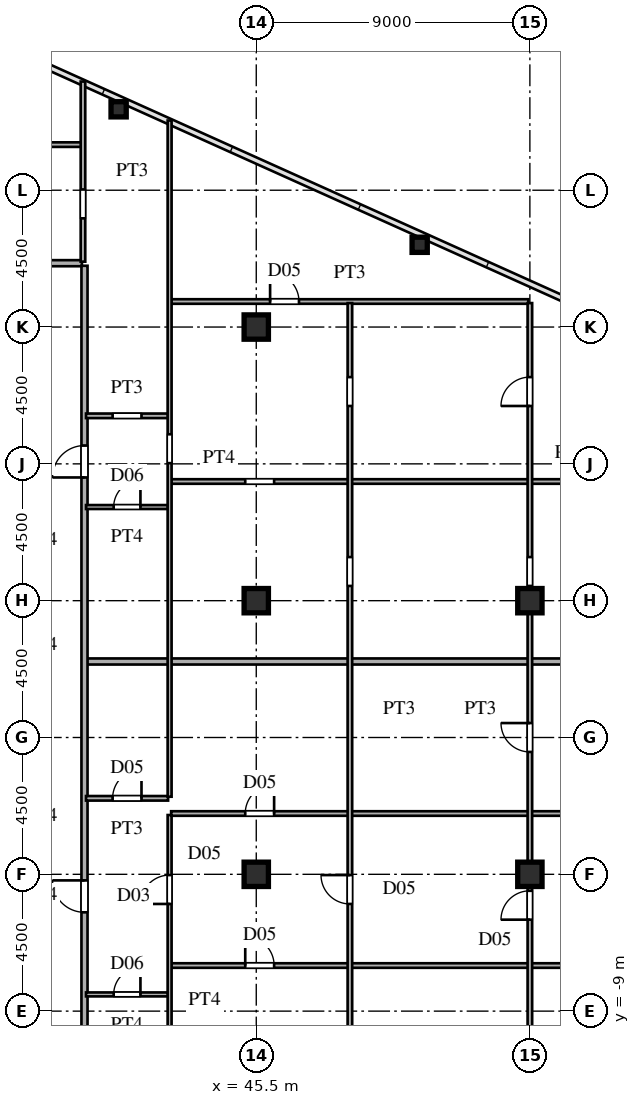
"""IFC4 building model, lengths in metres.
Left out: names, types, materials, properties, quantities, classifications, styles, units other than length and angle.
Written with IfcOpenShell. Run it as: python <this file> out.ifc"""

import sys

from ifc_helpers import new_model, si_unit, direction, frame, frame_2d, origin, origin_2d, place, context, subcontext, project, spatial, rectangle, hollow_rectangle, i_section, extrude, source, transform, mapped, element, fill, save


model = new_model("IFC4")
c1 = context("Model", 3, precision=1e-05, world=origin(), true_north=direction((0.0, 1.0)))
c2 = subcontext(c1, "Body", "Model", "MODEL_VIEW")
j1 = project(units=[si_unit("LENGTHUNIT", "METRE"), si_unit("PLANEANGLEUNIT", "RADIAN")], contexts=[c1])
p1 = place(None, origin())
s1 = spatial("IfcSite", under=j1, at=p1, CompositionType="ELEMENT")
p2 = place(p1, origin())
s2 = spatial("IfcBuilding", under=s1, at=p2, CompositionType="ELEMENT")
p3 = place(p2, frame((0.0, 0.0, 96.0)))
s3 = spatial("IfcBuildingStorey", under=s2, at=p3, CompositionType="ELEMENT", Elevation=96.0)
m1 = source(origin(), c2, "Body", "SweptSolid", [
    extrude(i_section(OverallWidth=0.8, OverallDepth=0.8, WebThickness=0.032, FlangeThickness=0.05, at=origin_2d()), origin(), (0.0, 0.0, 1.0), 3.6),
])
for number, where, z_axis, x_axis in (
    (1, (45.5, -4.5, 0.0), (0.0, 0.0, 1.0), (1.0, 0.0, 0.0)),
    (2, (45.5, 4.5, 0.0), (0.0, 0.0, 1.0), (1.0, 0.0, 0.0)),
    (3, (45.5, 13.5, 0.0), (0.0, 0.0, 1.0), (1.0, 0.0, 0.0)),
    (4, (54.5, -4.5, 0.0), (0.0, 0.0, 1.0), (1.0, 0.0, 0.0)),
    (5, (54.5, 4.5, 0.0), (0.0, 0.0, 1.0), (1.0, 0.0, 0.0)),
):
    element("IfcColumn", number, at=place(p3, frame(where, z_axis=z_axis, x_axis=x_axis)), inside=s3, PredefinedType="COLUMN", context=c2, shape_type="MappedRepresentation", body=[
        mapped(m1, transform((0.0, 0.0, 0.0), scale=1.0)),
    ])
m2 = source(origin(), c2, "Body", "SweptSolid", [
    extrude(hollow_rectangle(XDim=0.5, YDim=0.5, WallThickness=0.02, at=origin_2d()), origin(), (0.0, 0.0, 1.0), 3.6),
])
for number, where, z_axis, x_axis in (
    (6, (40.973, 20.661, 0.0), (0.0, 0.0, 1.0), (1.0, 0.0, 0.0)),
    (7, (50.875, 16.205, 0.0), (0.0, 0.0, 1.0), (1.0, 0.0, 0.0)),
):
    element("IfcColumn", number, at=place(p3, frame(where, z_axis=z_axis, x_axis=x_axis)), inside=s3, PredefinedType="COLUMN", context=c2, shape_type="MappedRepresentation", body=[
        mapped(m2, transform((0.0, 0.0, 0.0), scale=1.0)),
    ])
p4 = place(p3, frame((39.9, -8.45, 0.0), z_axis=(0.0, 0.0, 1.0), x_axis=(1.0, 0.0, 0.0)))
e8 = element("IfcWall", 8, at=p4, inside=s3, PredefinedType="PARTITIONING", context=c2, shape_type="SweptSolid", body=[
    extrude(rectangle(XDim=2.7, YDim=0.13, at=frame_2d((1.35, 0.0))), origin(), (0.0, 0.0, 1.0), 3.38),
])
p5 = place(p4, frame((0.91, 0.0, 0.0)))
e9 = element("IfcOpeningElement", 9, at=p5, cuts=e8, PredefinedType="OPENING", context=c2, shape_type="SweptSolid", body=[
    extrude(rectangle(XDim=0.88, YDim=2.1, at=frame_2d((0.44, 1.05))), frame((0.0, 0.075, 0.0), z_axis=(0.0, -1.0, 0.0), x_axis=(1.0, 0.0, 0.0)), (0.0, 0.0, 1.0), 0.15),
])
p6 = place(p3, frame((42.7, -7.5, 0.0), z_axis=(0.0, 0.0, 1.0), x_axis=(1.0, 0.0, 0.0)))
e10 = element("IfcWall", 10, at=p6, inside=s3, PredefinedType="PARTITIONING", context=c2, shape_type="SweptSolid", body=[
    extrude(rectangle(XDim=27.995, YDim=0.15, at=frame_2d((13.998, 0.0))), origin(), (0.0, 0.0, 1.0), 3.38),
])
p7 = place(p6, frame((2.438, 0.0, 0.0)))
e11 = element("IfcOpeningElement", 11, at=p7, cuts=e10, PredefinedType="OPENING", context=c2, shape_type="SweptSolid", body=[
    extrude(rectangle(XDim=0.95, YDim=2.15, at=frame_2d((0.475, 1.075))), frame((0.0, 0.085, 0.0), z_axis=(0.0, -1.0, 0.0), x_axis=(1.0, 0.0, 0.0)), (0.0, 0.0, 1.0), 0.17),
])
p8 = place(p6, frame((14.175, 0.0, 0.0)))
e12 = element("IfcOpeningElement", 12, at=p8, cuts=e10, PredefinedType="OPENING", context=c2, shape_type="SweptSolid", body=[
    extrude(rectangle(XDim=0.95, YDim=2.15, at=frame_2d((0.475, 1.075))), frame((0.0, 0.085, 0.0), z_axis=(0.0, -1.0, 0.0), x_axis=(1.0, 0.0, 0.0)), (0.0, 0.0, 1.0), 0.17),
])
p9 = place(p3, frame((42.7, -2.5, 0.0), z_axis=(0.0, 0.0, 1.0), x_axis=(1.0, 0.0, 0.0)))
e13 = element("IfcWall", 13, at=p9, inside=s3, PredefinedType="PARTITIONING", context=c2, shape_type="SweptSolid", body=[
    extrude(rectangle(XDim=28.335, YDim=0.15, at=frame_2d((14.167, 0.0))), origin(), (0.0, 0.0, 1.0), 3.38),
])
p10 = place(p9, frame((2.438, 0.0, 0.0)))
e14 = element("IfcOpeningElement", 14, at=p10, cuts=e13, PredefinedType="OPENING", context=c2, shape_type="SweptSolid", body=[
    extrude(rectangle(XDim=0.95, YDim=2.15, at=frame_2d((0.475, 1.075))), frame((0.0, 0.085, 0.0), z_axis=(0.0, -1.0, 0.0), x_axis=(1.0, 0.0, 0.0)), (0.0, 0.0, 1.0), 0.17),
])
p11 = place(p9, frame((14.175, 0.0, 0.0)))
e15 = element("IfcOpeningElement", 15, at=p11, cuts=e13, PredefinedType="OPENING", context=c2, shape_type="SweptSolid", body=[
    extrude(rectangle(XDim=0.95, YDim=2.15, at=frame_2d((0.475, 1.075))), frame((0.0, 0.085, 0.0), z_axis=(0.0, -1.0, 0.0), x_axis=(1.0, 0.0, 0.0)), (0.0, 0.0, 1.0), 0.17),
])
p12 = place(p3, frame((39.9, -2.0, 0.0), z_axis=(0.0, 0.0, 1.0), x_axis=(1.0, 0.0, 0.0)))
e16 = element("IfcWall", 16, at=p12, inside=s3, PredefinedType="PARTITIONING", context=c2, shape_type="SweptSolid", body=[
    extrude(rectangle(XDim=2.7, YDim=0.15, at=frame_2d((1.35, 0.0))), origin(), (0.0, 0.0, 1.0), 3.38),
])
p13 = place(p12, frame((0.875, 0.0, 0.0)))
e17 = element("IfcOpeningElement", 17, at=p13, cuts=e16, PredefinedType="OPENING", context=c2, shape_type="SweptSolid", body=[
    extrude(rectangle(XDim=0.95, YDim=2.15, at=frame_2d((0.475, 1.075))), frame((0.0, 0.085, 0.0), z_axis=(0.0, -1.0, 0.0), x_axis=(1.0, 0.0, 0.0)), (0.0, 0.0, 1.0), 0.17),
])
p14 = place(p3, frame((39.93, 2.5, 0.0), z_axis=(0.0, 0.0, 1.0), x_axis=(1.0, 0.0, 0.0)))
e18 = element("IfcWall", 18, at=p14, inside=s3, PredefinedType="PARTITIONING", context=c2, shape_type="SweptSolid", body=[
    extrude(rectangle(XDim=31.075, YDim=0.2, at=frame_2d((15.538, 0.0))), origin(), (0.0, 0.0, 1.0), 3.38),
])
p15 = place(p3, frame((39.9, 7.58, 0.0), z_axis=(0.0, 0.0, 1.0), x_axis=(1.0, 0.0, 0.0)))
e19 = element("IfcWall", 19, at=p15, inside=s3, PredefinedType="PARTITIONING", context=c2, shape_type="SweptSolid", body=[
    extrude(rectangle(XDim=2.7, YDim=0.13, at=frame_2d((1.35, 0.0))), origin(), (0.0, 0.0, 1.0), 3.38),
])
p16 = place(p15, frame((0.91, 0.0, 0.0)))
e20 = element("IfcOpeningElement", 20, at=p16, cuts=e19, PredefinedType="OPENING", context=c2, shape_type="SweptSolid", body=[
    extrude(rectangle(XDim=0.88, YDim=2.1, at=frame_2d((0.44, 1.05))), frame((0.0, 0.075, 0.0), z_axis=(0.0, -1.0, 0.0), x_axis=(1.0, 0.0, 0.0)), (0.0, 0.0, 1.0), 0.15),
])
p17 = place(p3, frame((42.7, 8.42, 0.0), z_axis=(0.0, 0.0, 1.0), x_axis=(1.0, 0.0, 0.0)))
e21 = element("IfcWall", 21, at=p17, inside=s3, PredefinedType="PARTITIONING", context=c2, shape_type="SweptSolid", body=[
    extrude(rectangle(XDim=26.292, YDim=0.15, at=frame_2d((13.146, 0.0))), origin(), (0.0, 0.0, 1.0), 3.38),
])
p18 = place(p17, frame((2.438, 0.0, 0.0)))
e22 = element("IfcOpeningElement", 22, at=p18, cuts=e21, PredefinedType="OPENING", context=c2, shape_type="SweptSolid", body=[
    extrude(rectangle(XDim=0.95, YDim=2.15, at=frame_2d((0.475, 1.075))), frame((0.0, 0.085, 0.0), z_axis=(0.0, -1.0, 0.0), x_axis=(1.0, 0.0, 0.0)), (0.0, 0.0, 1.0), 0.17),
])
p19 = place(p3, frame((39.9, 10.58, 0.0), z_axis=(0.0, 0.0, 1.0), x_axis=(1.0, 0.0, 0.0)))
e23 = element("IfcWall", 23, at=p19, inside=s3, PredefinedType="PARTITIONING", context=c2, shape_type="SweptSolid", body=[
    extrude(rectangle(XDim=2.7, YDim=0.15, at=frame_2d((1.35, 0.0))), origin(), (0.0, 0.0, 1.0), 3.38),
])
p20 = place(p19, frame((0.875, 0.0, 0.0)))
e24 = element("IfcOpeningElement", 24, at=p20, cuts=e23, PredefinedType="OPENING", context=c2, shape_type="SweptSolid", body=[
    extrude(rectangle(XDim=0.95, YDim=2.15, at=frame_2d((0.475, 1.075))), frame((0.0, 0.085, 0.0), z_axis=(0.0, -1.0, 0.0), x_axis=(1.0, 0.0, 0.0)), (0.0, 0.0, 1.0), 0.17),
])
p21 = place(p3, frame((42.7, 14.34, 0.0), z_axis=(0.0, 0.0, 1.0), x_axis=(1.0, 0.0, 0.0)))
e25 = element("IfcWall", 25, at=p21, inside=s3, PredefinedType="PARTITIONING", context=c2, shape_type="SweptSolid", body=[
    extrude(rectangle(XDim=11.75, YDim=0.15, at=frame_2d((5.875, 0.0))), origin(), (0.0, 0.0, 1.0), 3.38),
])
p22 = place(p21, frame((3.255, 0.0, 0.0)))
e26 = element("IfcOpeningElement", 26, at=p22, cuts=e25, PredefinedType="OPENING", context=c2, shape_type="SweptSolid", body=[
    extrude(rectangle(XDim=0.95, YDim=2.15, at=frame_2d((0.475, 1.075))), frame((0.0, 0.085, 0.0), z_axis=(0.0, -1.0, 0.0), x_axis=(1.0, 0.0, 0.0)), (0.0, 0.0, 1.0), 0.17),
])
p23 = place(p3, frame((36.585, 15.6, 0.0), z_axis=(0.0, 0.0, 1.0), x_axis=(1.0, 0.0, 0.0)))
e27 = element("IfcWall", 27, at=p23, inside=s3, PredefinedType="PARTITIONING", context=c2, shape_type="SweptSolid", body=[
    extrude(rectangle(XDim=3.18, YDim=0.2, at=frame_2d((1.59, 0.0))), origin(), (0.0, 0.0, 1.0), 3.38),
])
p24 = place(p3, frame((27.465, 19.5, 0.0), z_axis=(0.0, 0.0, 1.0), x_axis=(1.0, 0.0, 0.0)))
e28 = element("IfcWall", 28, at=p24, inside=s3, PredefinedType="PARTITIONING", context=c2, shape_type="SweptSolid", body=[
    extrude(rectangle(XDim=12.285, YDim=0.15, at=frame_2d((6.143, 0.0))), origin(), (0.0, 0.0, 1.0), 3.38),
])
p25 = place(p24, frame((5.71, 0.0, 0.0)))
e29 = element("IfcOpeningElement", 29, at=p25, cuts=e28, PredefinedType="OPENING", context=c2, shape_type="SweptSolid", body=[
    extrude(rectangle(XDim=0.95, YDim=2.15, at=frame_2d((0.475, 1.075))), frame((0.0, 0.085, 0.0), z_axis=(0.0, -1.0, 0.0), x_axis=(1.0, 0.0, 0.0)), (0.0, 0.0, 1.0), 0.17),
])
p26 = place(p3, frame((39.8, 15.65, 0.0), z_axis=(0.0, 0.0, 1.0), x_axis=(0.0, 1.0, 0.0)))
e30 = element("IfcWall", 30, at=p26, inside=s3, PredefinedType="PARTITIONING", context=c2, shape_type="SweptSolid", body=[
    extrude(rectangle(XDim=5.925, YDim=0.15, at=frame_2d((2.962, 0.0))), origin(), (0.0, 0.0, 1.0), 3.38),
])
p27 = place(p26, frame((1.425, 0.0, 0.0)))
e31 = element("IfcOpeningElement", 31, at=p27, cuts=e30, PredefinedType="OPENING", context=c2, shape_type="SweptSolid", body=[
    extrude(rectangle(XDim=0.95, YDim=2.15, at=frame_2d((0.475, 1.075))), frame((0.0, 0.085, 0.0), z_axis=(0.0, -1.0, 0.0), x_axis=(1.0, 0.0, 0.0)), (0.0, 0.0, 1.0), 0.17),
])
p28 = place(p3, frame((39.85, -15.515, 0.0), z_axis=(0.0, 0.0, 1.0), x_axis=(0.0, 1.0, 0.0)))
e32 = element("IfcWall", 32, at=p28, inside=s3, PredefinedType="PARTITIONING", context=c2, shape_type="SweptSolid", body=[
    extrude(rectangle(XDim=31.03, YDim=0.2, at=frame_2d((15.515, 0.0))), origin(), (0.0, 0.0, 1.0), 3.38),
])
p29 = place(p28, frame((0.94, 0.0, 0.0)))
e33 = element("IfcOpeningElement", 33, at=p29, cuts=e32, PredefinedType="OPENING", context=c2, shape_type="SweptSolid", body=[
    extrude(rectangle(XDim=1.05, YDim=2.25, at=frame_2d((0.525, 1.125))), frame((0.0, 0.11, 0.0), z_axis=(0.0, -1.0, 0.0), x_axis=(1.0, 0.0, 0.0)), (0.0, 0.0, 1.0), 0.22),
])
p30 = place(p28, frame((9.765, 0.0, 0.0)))
e34 = element("IfcOpeningElement", 34, at=p30, cuts=e32, PredefinedType="OPENING", context=c2, shape_type="SweptSolid", body=[
    extrude(rectangle(XDim=1.05, YDim=2.25, at=frame_2d((0.525, 1.125))), frame((0.0, 0.11, 0.0), z_axis=(0.0, -1.0, 0.0), x_axis=(1.0, 0.0, 0.0)), (0.0, 0.0, 1.0), 0.22),
])
p31 = place(p28, frame((24.067, 0.0, 0.0)))
e35 = element("IfcOpeningElement", 35, at=p31, cuts=e32, PredefinedType="OPENING", context=c2, shape_type="SweptSolid", body=[
    extrude(rectangle(XDim=1.05, YDim=2.25, at=frame_2d((0.525, 1.125))), frame((0.0, 0.11, 0.0), z_axis=(0.0, -1.0, 0.0), x_axis=(1.0, 0.0, 0.0)), (0.0, 0.0, 1.0), 0.22),
])
p32 = place(p3, frame((42.65, -12.45, 0.0), z_axis=(0.0, 0.0, 1.0), x_axis=(0.0, 1.0, 0.0)))
e36 = element("IfcWall", 36, at=p32, inside=s3, PredefinedType="PARTITIONING", context=c2, shape_type="SweptSolid", body=[
    extrude(rectangle(XDim=9.9, YDim=0.13, at=frame_2d((4.95, 0.0))), origin(), (0.0, 0.0, 1.0), 3.38),
])
p33 = place(p32, frame((6.975, 0.0, 0.0)))
e37 = element("IfcOpeningElement", 37, at=p33, cuts=e36, PredefinedType="OPENING", context=c2, shape_type="SweptSolid", body=[
    extrude(rectangle(XDim=0.95, YDim=2.15, at=frame_2d((0.475, 1.075))), frame((0.0, 0.075, 0.0), z_axis=(0.0, -1.0, 0.0), x_axis=(1.0, 0.0, 0.0)), (0.0, 0.0, 1.0), 0.15),
])
p34 = place(p3, frame((42.65, -1.948, 0.0), z_axis=(0.0, 0.0, 1.0), x_axis=(0.0, 1.0, 0.0)))
e38 = element("IfcWall", 38, at=p34, inside=s3, PredefinedType="PARTITIONING", context=c2, shape_type="SweptSolid", body=[
    extrude(rectangle(XDim=22.241, YDim=0.13, at=frame_2d((11.121, 0.0))), origin(), (0.0, 0.0, 1.0), 3.38),
])
p35 = place(p34, frame((10.971, 0.0, 0.0)))
e39 = element("IfcOpeningElement", 39, at=p35, cuts=e38, PredefinedType="OPENING", context=c2, shape_type="SweptSolid", body=[
    extrude(rectangle(XDim=0.95, YDim=2.15, at=frame_2d((0.475, 1.075))), frame((0.0, 0.075, 0.0), z_axis=(0.0, -1.0, 0.0), x_axis=(1.0, 0.0, 0.0)), (0.0, 0.0, 1.0), 0.15),
])
p36 = place(p3, frame((48.58, -12.45, 0.0), z_axis=(0.0, 0.0, 1.0), x_axis=(0.0, 1.0, 0.0)))
e40 = element("IfcWall", 40, at=p36, inside=s3, PredefinedType="PARTITIONING", context=c2, shape_type="SweptSolid", body=[
    extrude(rectangle(XDim=26.738, YDim=0.15, at=frame_2d((13.369, 0.0))), origin(), (0.0, 0.0, 1.0), 3.38),
])
p37 = place(p36, frame((6.975, 0.0, 0.0)))
e41 = element("IfcOpeningElement", 41, at=p37, cuts=e40, PredefinedType="OPENING", context=c2, shape_type="SweptSolid", body=[
    extrude(rectangle(XDim=0.95, YDim=2.15, at=frame_2d((0.475, 1.075))), frame((0.0, 0.085, 0.0), z_axis=(0.0, -1.0, 0.0), x_axis=(1.0, 0.0, 0.0)), (0.0, 0.0, 1.0), 0.17),
])
p38 = place(p36, frame((1.975, 0.0, 0.0)))
e42 = element("IfcOpeningElement", 42, at=p38, cuts=e40, PredefinedType="OPENING", context=c2, shape_type="SweptSolid", body=[
    extrude(rectangle(XDim=0.95, YDim=2.15, at=frame_2d((0.475, 1.075))), frame((0.0, 0.085, 0.0), z_axis=(0.0, -1.0, 0.0), x_axis=(1.0, 0.0, 0.0)), (0.0, 0.0, 1.0), 0.17),
])
p39 = place(p36, frame((23.354, 0.0, 0.0)))
e43 = element("IfcOpeningElement", 43, at=p39, cuts=e40, PredefinedType="OPENING", context=c2, shape_type="SweptSolid", body=[
    extrude(rectangle(XDim=0.95, YDim=2.15, at=frame_2d((0.475, 1.075))), frame((0.0, 0.085, 0.0), z_axis=(0.0, -1.0, 0.0), x_axis=(1.0, 0.0, 0.0)), (0.0, 0.0, 1.0), 0.17),
])
p40 = place(p36, frame((17.435, 0.0, 0.0)))
e44 = element("IfcOpeningElement", 44, at=p40, cuts=e40, PredefinedType="OPENING", context=c2, shape_type="SweptSolid", body=[
    extrude(rectangle(XDim=0.95, YDim=2.15, at=frame_2d((0.475, 1.075))), frame((0.0, 0.085, 0.0), z_axis=(0.0, -1.0, 0.0), x_axis=(1.0, 0.0, 0.0)), (0.0, 0.0, 1.0), 0.17),
])
p41 = place(p3, frame((54.5, -12.45, 0.0), z_axis=(0.0, 0.0, 1.0), x_axis=(0.0, 1.0, 0.0)))
e45 = element("IfcWall", 45, at=p41, inside=s3, PredefinedType="PARTITIONING", context=c2, shape_type="SweptSolid", body=[
    extrude(rectangle(XDim=26.738, YDim=0.15, at=frame_2d((13.369, 0.0))), origin(), (0.0, 0.0, 1.0), 2.68),
])
p42 = place(p41, frame((6.458, 0.0, 0.0)))
e46 = element("IfcOpeningElement", 46, at=p42, cuts=e45, PredefinedType="OPENING", context=c2, shape_type="SweptSolid", body=[
    extrude(rectangle(XDim=0.95, YDim=2.15, at=frame_2d((0.475, 1.075))), frame((0.0, 0.085, 0.0), z_axis=(0.0, -1.0, 0.0), x_axis=(1.0, 0.0, 0.0)), (0.0, 0.0, 1.0), 0.17),
])
p43 = place(p41, frame((11.975, 0.0, 0.0)))
e47 = element("IfcOpeningElement", 47, at=p43, cuts=e45, PredefinedType="OPENING", context=c2, shape_type="SweptSolid", body=[
    extrude(rectangle(XDim=0.95, YDim=2.15, at=frame_2d((0.475, 1.075))), frame((0.0, 0.085, 0.0), z_axis=(0.0, -1.0, 0.0), x_axis=(1.0, 0.0, 0.0)), (0.0, 0.0, 1.0), 0.17),
])
p44 = place(p41, frame((23.354, 0.0, 0.0)))
e48 = element("IfcOpeningElement", 48, at=p44, cuts=e45, PredefinedType="OPENING", context=c2, shape_type="SweptSolid", body=[
    extrude(rectangle(XDim=0.95, YDim=2.15, at=frame_2d((0.475, 1.075))), frame((0.0, 0.085, 0.0), z_axis=(0.0, -1.0, 0.0), x_axis=(1.0, 0.0, 0.0)), (0.0, 0.0, 1.0), 0.17),
])
p45 = place(p41, frame((17.435, 0.0, 0.0)))
e49 = element("IfcOpeningElement", 49, at=p45, cuts=e45, PredefinedType="OPENING", context=c2, shape_type="SweptSolid", body=[
    extrude(rectangle(XDim=0.95, YDim=2.15, at=frame_2d((0.475, 1.075))), frame((0.0, 0.085, 0.0), z_axis=(0.0, -1.0, 0.0), x_axis=(1.0, 0.0, 0.0)), (0.0, 0.0, 1.0), 0.17),
])
m3 = source(origin(), c2, "Body", "SweptSolid", [
    extrude(rectangle(XDim=0.88, YDim=2.1, at=frame_2d((0.44, 1.05))), frame((0.0, 0.025, 0.0), z_axis=(0.0, -1.0, 0.0), x_axis=(1.0, 0.0, 0.0)), (0.0, 0.0, 1.0), 0.05),
])
p46 = place(p5, origin())
e50 = element("IfcDoor", 50, at=p46, inside=s3, OperationType="SINGLE_SWING_RIGHT", PredefinedType="DOOR", context=c2, shape_type="MappedRepresentation", body=[
    mapped(m3, transform((0.0, 0.0, 0.0), scale=1.0)),
])
fill(e9, e50)
m4 = source(origin(), c2, "Body", "SweptSolid", [
    extrude(rectangle(XDim=0.95, YDim=2.15, at=frame_2d((0.475, 1.075))), frame((0.0, 0.025, 0.0), z_axis=(0.0, -1.0, 0.0), x_axis=(1.0, 0.0, 0.0)), (0.0, 0.0, 1.0), 0.05),
])
p47 = place(p7, origin())
e51 = element("IfcDoor", 51, at=p47, inside=s3, OperationType="SINGLE_SWING_LEFT", PredefinedType="DOOR", context=c2, shape_type="MappedRepresentation", body=[
    mapped(m4, transform((0.0, 0.0, 0.0), scale=1.0)),
])
fill(e11, e51)
p48 = place(p10, origin())
e52 = element("IfcDoor", 52, at=p48, inside=s3, OperationType="SINGLE_SWING_RIGHT", PredefinedType="DOOR", context=c2, shape_type="MappedRepresentation", body=[
    mapped(m4, transform((0.0, 0.0, 0.0), scale=1.0)),
])
fill(e14, e52)
p49 = place(p13, origin())
e53 = element("IfcDoor", 53, at=p49, inside=s3, OperationType="SINGLE_SWING_RIGHT", PredefinedType="DOOR", context=c2, shape_type="MappedRepresentation", body=[
    mapped(m4, transform((0.0, 0.0, 0.0), scale=1.0)),
])
fill(e17, e53)
p50 = place(p16, origin())
e54 = element("IfcDoor", 54, at=p50, inside=s3, OperationType="SINGLE_SWING_RIGHT", PredefinedType="DOOR", context=c2, shape_type="MappedRepresentation", body=[
    mapped(m3, transform((0.0, 0.0, 0.0), scale=1.0)),
])
fill(e20, e54)
p51 = place(p22, origin())
e55 = element("IfcDoor", 55, at=p51, inside=s3, OperationType="SINGLE_SWING_LEFT", PredefinedType="DOOR", context=c2, shape_type="MappedRepresentation", body=[
    mapped(m4, transform((0.0, 0.0, 0.0), scale=1.0)),
])
fill(e26, e55)
m5 = source(origin(), c2, "Body", "SweptSolid", [
    extrude(rectangle(XDim=1.05, YDim=2.25, at=frame_2d((0.525, 1.125))), frame((0.0, 0.025, 0.0), z_axis=(0.0, -1.0, 0.0), x_axis=(1.0, 0.0, 0.0)), (0.0, 0.0, 1.0), 0.05),
])
p52 = place(p30, origin())
e56 = element("IfcDoor", 56, at=p52, inside=s3, OperationType="SINGLE_SWING_RIGHT", PredefinedType="DOOR", context=c2, shape_type="MappedRepresentation", body=[
    mapped(m5, transform((0.0, 0.0, 0.0), scale=1.0)),
])
fill(e34, e56)
p53 = place(p31, origin())
e57 = element("IfcDoor", 57, at=p53, inside=s3, OperationType="SINGLE_SWING_LEFT", PredefinedType="DOOR", context=c2, shape_type="MappedRepresentation", body=[
    mapped(m5, transform((0.0, 0.0, 0.0), scale=1.0)),
])
fill(e35, e57)
p54 = place(p33, origin())
e58 = element("IfcDoor", 58, at=p54, inside=s3, OperationType="SINGLE_SWING_LEFT", PredefinedType="DOOR", context=c2, shape_type="MappedRepresentation", body=[
    mapped(m4, transform((0.0, 0.0, 0.0), scale=1.0)),
])
fill(e37, e58)
p55 = place(p37, origin())
e59 = element("IfcDoor", 59, at=p55, inside=s3, OperationType="SINGLE_SWING_RIGHT", PredefinedType="DOOR", context=c2, shape_type="MappedRepresentation", body=[
    mapped(m4, transform((0.0, 0.0, 0.0), scale=1.0)),
])
fill(e41, e59)
p56 = place(p42, origin())
e60 = element("IfcDoor", 60, at=p56, inside=s3, OperationType="SINGLE_SWING_LEFT", PredefinedType="DOOR", context=c2, shape_type="MappedRepresentation", body=[
    mapped(m4, transform((0.0, 0.0, 0.0), scale=1.0)),
])
fill(e46, e60)
p57 = place(p43, origin())
e61 = element("IfcDoor", 61, at=p57, inside=s3, OperationType="SINGLE_SWING_RIGHT", PredefinedType="DOOR", context=c2, shape_type="MappedRepresentation", body=[
    mapped(m4, transform((0.0, 0.0, 0.0), scale=1.0)),
])
fill(e47, e61)
p58 = place(p44, origin())
e62 = element("IfcDoor", 62, at=p58, inside=s3, OperationType="SINGLE_SWING_LEFT", PredefinedType="DOOR", context=c2, shape_type="MappedRepresentation", body=[
    mapped(m4, transform((0.0, 0.0, 0.0), scale=1.0)),
])
fill(e48, e62)
save(model, sys.argv[1])
